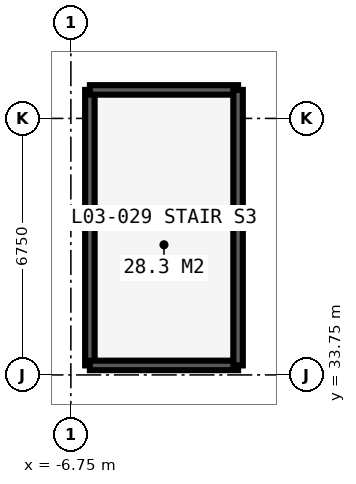
"""IFC4 building model, lengths in metres.
Left out: names, types, materials, properties, quantities, classifications, styles, units other than length and angle.
Written with IfcOpenShell. Run it as: python <this file> out.ifc"""

import sys

from ifc_helpers import new_model, si_unit, direction, frame, frame_2d, origin, place, context, subcontext, project, spatial, rectangle, extrude, element, fill, save


model = new_model("IFC4")
c1 = context("Model", 3, precision=1e-05, world=origin(), true_north=direction((0.0, 1.0)))
c2 = subcontext(c1, "Body", "Model", "MODEL_VIEW")
j1 = project(units=[si_unit("LENGTHUNIT", "METRE"), si_unit("PLANEANGLEUNIT", "RADIAN")], contexts=[c1])
p1 = place(None, origin())
s1 = spatial("IfcSite", under=j1, at=p1, CompositionType="ELEMENT")
p2 = place(p1, origin())
s2 = spatial("IfcBuilding", under=s1, at=p2, CompositionType="ELEMENT")
p3 = place(p2, frame((0.0, 0.0, 13.5)))
s3 = spatial("IfcBuildingStorey", under=s2, at=p3, CompositionType="ELEMENT", Elevation=13.5)
p4 = place(p3, frame((-6.25, 34.0, -0.06), z_axis=(0.0, 0.0, 1.0), x_axis=(0.0, 1.0, 0.0)))
e1 = element("IfcWall", 1, at=p4, inside=s3, PredefinedType="SOLIDWALL", context=c2, shape_type="SweptSolid", body=[
    extrude(rectangle(XDim=7.25, YDim=0.25, at=frame_2d((3.625, 0.0))), origin(), (0.0, 0.0, 1.0), 4.335),
])
p5 = place(p3, frame((-6.25, 34.0, -0.06), z_axis=(0.0, 0.0, 1.0), x_axis=(1.0, 0.0, 0.0)))
e2 = element("IfcWall", 2, at=p5, inside=s3, PredefinedType="SOLIDWALL", context=c2, shape_type="SweptSolid", body=[
    extrude(rectangle(XDim=3.9, YDim=0.25, at=frame_2d((1.95, 0.0))), origin(), (0.0, 0.0, 1.0), 4.335),
])
p6 = place(p5, frame((1.35, 0.0, 0.0)))
e3 = element("IfcOpeningElement", 3, at=p6, cuts=e2, PredefinedType="OPENING", context=c2, shape_type="SweptSolid", body=[
    extrude(rectangle(XDim=1.2, YDim=2.2, at=frame_2d((0.6, 1.1))), frame((0.0, 0.135, 0.0), z_axis=(0.0, -1.0, 0.0), x_axis=(1.0, 0.0, 0.0)), (0.0, 0.0, 1.0), 0.27),
])
p7 = place(p3, frame((-6.25, 41.25, -0.06), z_axis=(0.0, 0.0, 1.0), x_axis=(1.0, 0.0, 0.0)))
e4 = element("IfcWall", 4, at=p7, inside=s3, PredefinedType="SOLIDWALL", context=c2, shape_type="SweptSolid", body=[
    extrude(rectangle(XDim=3.9, YDim=0.25, at=frame_2d((1.95, 0.0))), origin(), (0.0, 0.0, 1.0), 4.335),
])
p8 = place(p3, frame((-2.35, 34.0, -0.06), z_axis=(0.0, 0.0, 1.0), x_axis=(0.0, 1.0, 0.0)))
e5 = element("IfcWall", 5, at=p8, inside=s3, PredefinedType="SOLIDWALL", context=c2, shape_type="SweptSolid", body=[
    extrude(rectangle(XDim=7.25, YDim=0.25, at=frame_2d((3.625, 0.0))), origin(), (0.0, 0.0, 1.0), 4.335),
])
p9 = place(p6, origin())
e6 = element("IfcDoor", 6, at=p9, inside=s3, OperationType="SINGLE_SWING_LEFT", PredefinedType="DOOR", context=c2, shape_type="SweptSolid", body=[
    extrude(rectangle(XDim=1.2, YDim=2.2, at=frame_2d((0.6, 1.1))), frame((0.0, 0.025, 0.0), z_axis=(0.0, -1.0, 0.0), x_axis=(1.0, 0.0, 0.0)), (0.0, 0.0, 1.0), 0.05),
])
fill(e3, e6)
save(model, sys.argv[1])
